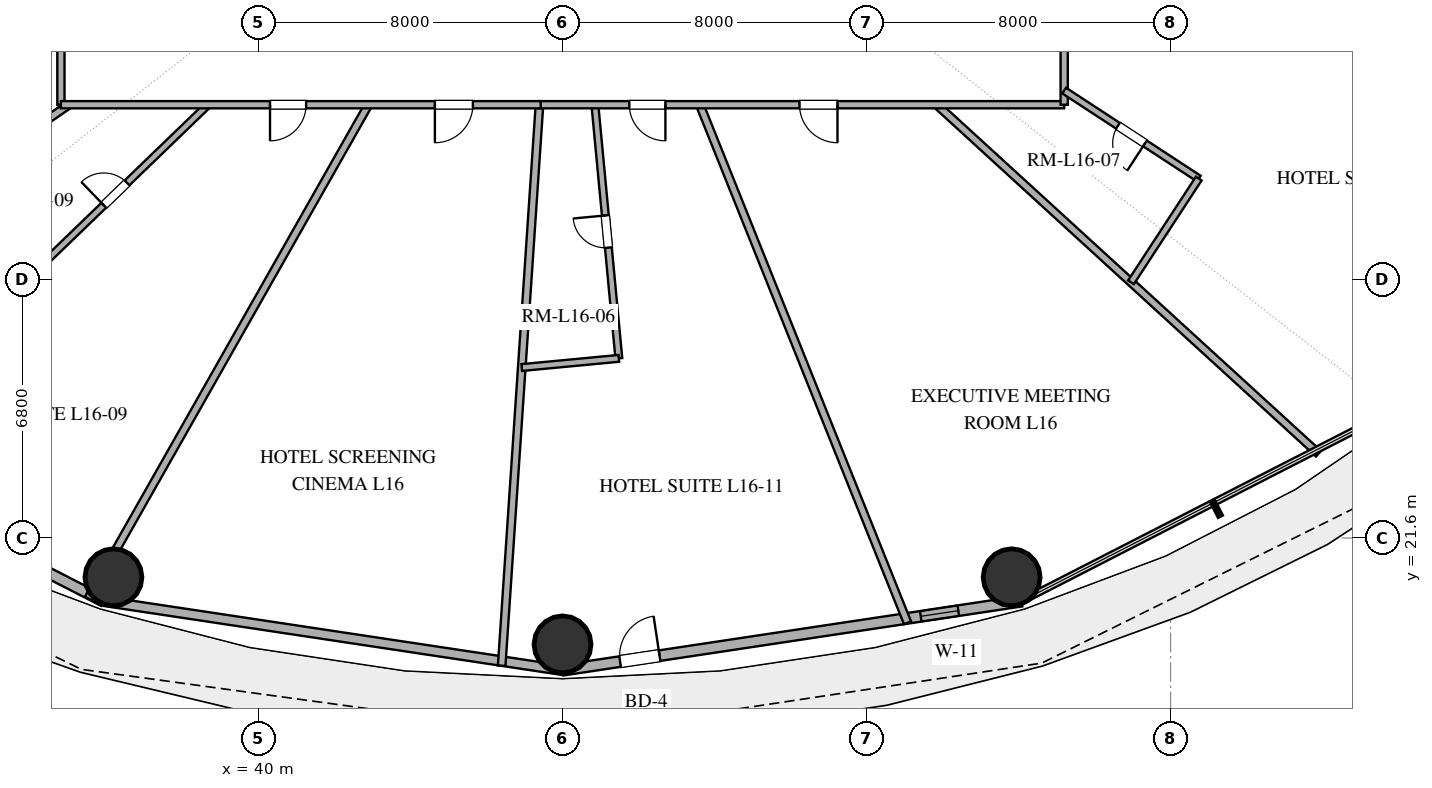
"""IFC4 building model, lengths in metres.
Left out: names, types, materials, properties, quantities, classifications, styles, units other than length and angle.
Written with IfcOpenShell. Run it as: python <this file> out.ifc"""

import sys

from ifc_helpers import new_model, si_unit, direction, frame, frame_2d, origin, origin_2d, place, context, subcontext, project, spatial, rectangle, hollow_circle, extrude, element, fill, save


model = new_model("IFC4")
c1 = context("Model", 3, precision=1e-05, world=origin(), true_north=direction((0.0, 1.0)))
c2 = subcontext(c1, "Body", "Model", "MODEL_VIEW")
j1 = project(units=[si_unit("LENGTHUNIT", "METRE"), si_unit("PLANEANGLEUNIT", "RADIAN")], contexts=[c1])
p1 = place(None, origin())
s1 = spatial("IfcSite", under=j1, at=p1, CompositionType="ELEMENT")
p2 = place(p1, origin())
s2 = spatial("IfcBuilding", under=s1, at=p2, CompositionType="ELEMENT")
p3 = place(p2, frame((0.0, 0.0, 67.8)))
s3 = spatial("IfcBuildingStorey", under=s2, at=p3, CompositionType="ELEMENT", Elevation=67.8)
for number, where, z_axis, x_axis in (
    (1, (36.182, 20.566, 0.0), (0.0, 0.0, 1.0), (1.0, 0.0, 0.0)),
    (2, (48.0, 18.8, 0.0), (0.0, 0.0, 1.0), (1.0, 0.0, 0.0)),
    (3, (59.818, 20.566, 0.0), (0.0, 0.0, 1.0), (1.0, 0.0, 0.0)),
):
    element("IfcColumn", number, at=place(p3, frame(where, z_axis=z_axis, x_axis=x_axis)), inside=s3, PredefinedType="COLUMN", context=c2, shape_type="SweptSolid", body=[
        extrude(hollow_circle(Radius=0.75, WallThickness=0.04, at=origin_2d()), origin(), (0.0, 0.0, 1.0), 3.38),
    ])
p4 = place(p3, frame((25.826, 25.114, 0.0), z_axis=(0.0, 0.0, 1.0), x_axis=(0.889853976658, -0.456245438581, 0.0)))
e4 = element("IfcWall", 4, at=p4, inside=s3, PredefinedType="SOLIDWALL", context=c2, shape_type="SweptSolid", body=[
    extrude(rectangle(XDim=11.346, YDim=0.28, at=frame_2d((5.673, 0.0))), origin(), (0.0, 0.0, 1.0), 3.38),
])
p5 = place(p4, frame((3.367, 0.0, 0.85)))
e5 = element("IfcOpeningElement", 5, at=p5, cuts=e4, PredefinedType="OPENING", context=c2, shape_type="SweptSolid", body=[
    extrude(rectangle(XDim=1.5, YDim=2.0, at=frame_2d((0.75, 1.0))), frame((0.0, 0.15, 0.0), z_axis=(0.0, -1.0, 0.0), x_axis=(1.0, 0.0, 0.0)), (0.0, 0.0, 1.0), 0.3),
])
p6 = place(p4, frame((6.629, 0.0, 0.85)))
e6 = element("IfcOpeningElement", 6, at=p6, cuts=e4, PredefinedType="OPENING", context=c2, shape_type="SweptSolid", body=[
    extrude(rectangle(XDim=1.5, YDim=2.0, at=frame_2d((0.75, 1.0))), frame((0.0, 0.15, 0.0), z_axis=(0.0, -1.0, 0.0), x_axis=(1.0, 0.0, 0.0)), (0.0, 0.0, 1.0), 0.3),
])
p7 = place(p3, frame((35.922, 19.938, 0.0), z_axis=(0.0, 0.0, 1.0), x_axis=(0.988864835849, -0.148816452121, 0.0)))
e7 = element("IfcWall", 7, at=p7, inside=s3, PredefinedType="SOLIDWALL", context=c2, shape_type="SweptSolid", body=[
    extrude(rectangle(XDim=12.214, YDim=0.25, at=frame_2d((6.107, 0.0))), origin(), (0.0, 0.0, 1.0), 3.38),
])
p8 = place(p3, frame((48.0, 18.12, 0.0), z_axis=(0.0, 0.0, 1.0), x_axis=(0.988864835849, 0.148816452121, 0.0)))
e8 = element("IfcWall", 8, at=p8, inside=s3, PredefinedType="SOLIDWALL", context=c2, shape_type="SweptSolid", body=[
    extrude(rectangle(XDim=12.214, YDim=0.28, at=frame_2d((6.107, 0.0))), origin(), (0.0, 0.0, 1.0), 3.38),
])
p9 = place(p8, frame((1.531, 0.0, 0.0)))
e9 = element("IfcOpeningElement", 9, at=p9, cuts=e8, PredefinedType="OPENING", context=c2, shape_type="SweptSolid", body=[
    extrude(rectangle(XDim=1.05, YDim=2.2, at=frame_2d((0.525, 1.1))), frame((0.0, 0.15, 0.0), z_axis=(0.0, -1.0, 0.0), x_axis=(1.0, 0.0, 0.0)), (0.0, 0.0, 1.0), 0.3),
])
p10 = place(p8, frame((9.531, 0.0, 0.85)))
e10 = element("IfcOpeningElement", 10, at=p10, cuts=e8, PredefinedType="OPENING", context=c2, shape_type="SweptSolid", body=[
    extrude(rectangle(XDim=1.0, YDim=1.8, at=frame_2d((0.5, 0.9))), frame((0.0, 0.15, 0.0), z_axis=(0.0, -1.0, 0.0), x_axis=(1.0, 0.0, 0.0)), (0.0, 0.0, 1.0), 0.3),
])
p11 = place(p3, frame((42.893, 33.0, 0.0), z_axis=(0.0, 0.0, 1.0), x_axis=(-0.493512300658, -0.869738816599, 0.0)))
e11 = element("IfcWall", 11, at=p11, inside=s3, PredefinedType="PARTITIONING", context=c2, shape_type="SweptSolid", body=[
    extrude(rectangle(XDim=14.938, YDim=0.2, at=frame_2d((7.469, 0.0))), origin(), (0.0, 0.0, 1.0), 2.74),
])
p12 = place(p3, frame((51.61, 33.0, 0.0), z_axis=(0.0, 0.0, 1.0), x_axis=(0.372301847193, -0.928111703717, 0.0)))
e12 = element("IfcWall", 12, at=p12, inside=s3, PredefinedType="PARTITIONING", context=c2, shape_type="SweptSolid", body=[
    extrude(rectangle(XDim=14.688, YDim=0.2, at=frame_2d((7.344, 0.0))), origin(), (0.0, 0.0, 1.0), 2.74),
])
p13 = place(p3, frame((76.816, 33.347, 0.0), z_axis=(0.0, 0.0, 1.0), x_axis=(-0.957749889613, 0.287602414708, 0.0)))
e13 = element("IfcWall", 13, at=p13, inside=s3, PredefinedType="PARTITIONING", context=c2, shape_type="SweptSolid", body=[
    extrude(rectangle(XDim=8.8, YDim=0.2, at=frame_2d((4.4, 0.0))), origin(), (0.0, 0.0, 1.0), 2.74),
])
p14 = place(p3, frame((35.009, 33.0, 0.0), z_axis=(0.0, 0.0, 1.0), x_axis=(-0.821999402566, -0.569488351226, 0.0)))
e14 = element("IfcWall", 14, at=p14, inside=s3, PredefinedType="PARTITIONING", context=c2, shape_type="SweptSolid", body=[
    extrude(rectangle(XDim=12.266, YDim=0.2, at=frame_2d((6.133, 0.0))), origin(), (0.0, 0.0, 1.0), 2.74),
])
p15 = place(p3, frame((47.393, 33.0, 0.0), z_axis=(0.0, 0.0, 1.0), x_axis=(-0.067284649742, -0.997733820169, 0.0)))
e15 = element("IfcWall", 15, at=p15, inside=s3, PredefinedType="PARTITIONING", context=c2, shape_type="SweptSolid", body=[
    extrude(rectangle(XDim=14.793, YDim=0.2, at=frame_2d((7.396, 0.0))), origin(), (0.0, 0.0, 1.0), 2.74),
])
p16 = place(p3, frame((57.846, 33.0, 0.0), z_axis=(0.0, 0.0, 1.0), x_axis=(0.738119160364, -0.674670367738, 0.0)))
e16 = element("IfcWall", 16, at=p16, inside=s3, PredefinedType="PARTITIONING", context=c2, shape_type="SweptSolid", body=[
    extrude(rectangle(XDim=13.61, YDim=0.2, at=frame_2d((6.805, 0.0))), origin(), (0.0, 0.0, 1.0), 2.74),
])
p17 = place(p3, frame((33.798, 28.299, 0.0), z_axis=(0.0, 0.0, 1.0), x_axis=(0.719667322044, 0.69431905172, 0.0)))
e17 = element("IfcWall", 17, at=p17, inside=s3, PredefinedType="PLUMBINGWALL", context=c2, shape_type="SweptSolid", body=[
    extrude(rectangle(XDim=6.771, YDim=0.18, at=frame_2d((3.385, 0.0))), origin(), (0.0, 0.0, 1.0), 2.74),
])
p18 = place(p17, frame((2.96, 0.0, 0.0)))
e18 = element("IfcOpeningElement", 18, at=p18, cuts=e17, PredefinedType="OPENING", context=c2, shape_type="SweptSolid", body=[
    extrude(rectangle(XDim=0.85, YDim=2.1, at=frame_2d((0.425, 1.05))), frame((0.0, 0.1, 0.0), z_axis=(0.0, -1.0, 0.0), x_axis=(1.0, 0.0, 0.0)), (0.0, 0.0, 1.0), 0.2),
])
p19 = place(p3, frame((49.482, 26.326, 0.0), z_axis=(0.0, 0.0, 1.0), x_axis=(-0.094107851527, 0.995562008255, 0.0)))
e19 = element("IfcWall", 19, at=p19, inside=s3, PredefinedType="PLUMBINGWALL", context=c2, shape_type="SweptSolid", body=[
    extrude(rectangle(XDim=6.704, YDim=0.18, at=frame_2d((3.352, 0.0))), origin(), (0.0, 0.0, 1.0), 2.74),
])
p20 = place(p19, frame((2.927, 0.0, 0.0)))
e20 = element("IfcOpeningElement", 20, at=p20, cuts=e19, PredefinedType="OPENING", context=c2, shape_type="SweptSolid", body=[
    extrude(rectangle(XDim=0.85, YDim=2.1, at=frame_2d((0.425, 1.05))), frame((0.0, 0.1, 0.0), z_axis=(0.0, -1.0, 0.0), x_axis=(1.0, 0.0, 0.0)), (0.0, 0.0, 1.0), 0.2),
])
p21 = place(p3, frame((61.2, 33.0, 0.0), z_axis=(0.0, 0.0, 1.0), x_axis=(-1.0, 0.0, 0.0)))
e21 = element("IfcWall", 21, at=p21, inside=s3, PredefinedType="PARTITIONING", context=c2, shape_type="SweptSolid", body=[
    extrude(rectangle(XDim=13.839, YDim=0.19, at=frame_2d((6.919, 0.0))), origin(), (0.0, 0.0, 1.0), 2.74),
])
p22 = place(p21, frame((5.965, 0.0, 0.0)))
e22 = element("IfcOpeningElement", 22, at=p22, cuts=e21, PredefinedType="OPENING", context=c2, shape_type="SweptSolid", body=[
    extrude(rectangle(XDim=1.0, YDim=2.2, at=frame_2d((0.5, 1.1))), frame((0.0, 0.105, 0.0), z_axis=(0.0, -1.0, 0.0), x_axis=(1.0, 0.0, 0.0)), (0.0, 0.0, 1.0), 0.21),
])
p23 = place(p21, frame((10.493, 0.0, 0.0)))
e23 = element("IfcOpeningElement", 23, at=p23, cuts=e21, PredefinedType="OPENING", context=c2, shape_type="SweptSolid", body=[
    extrude(rectangle(XDim=0.95, YDim=2.15, at=frame_2d((0.475, 1.075))), frame((0.0, 0.105, 0.0), z_axis=(0.0, -1.0, 0.0), x_axis=(1.0, 0.0, 0.0)), (0.0, 0.0, 1.0), 0.21),
])
p24 = place(p3, frame((61.2, 38.07, 0.0), z_axis=(0.0, 0.0, 1.0), x_axis=(0.0, -1.0, 0.0)))
e24 = element("IfcWall", 24, at=p24, inside=s3, PredefinedType="PARTITIONING", context=c2, shape_type="SweptSolid", body=[
    extrude(rectangle(XDim=5.07, YDim=0.19, at=frame_2d((2.535, 0.0))), origin(), (0.0, 0.0, 1.0), 2.74),
])
p25 = place(p24, frame((1.893, 0.0, 0.0)))
e25 = element("IfcOpeningElement", 25, at=p25, cuts=e24, PredefinedType="OPENING", context=c2, shape_type="SweptSolid", body=[
    extrude(rectangle(XDim=0.95, YDim=2.15, at=frame_2d((0.475, 1.075))), frame((0.0, 0.105, 0.0), z_axis=(0.0, -1.0, 0.0), x_axis=(1.0, 0.0, 0.0)), (0.0, 0.0, 1.0), 0.21),
])
p26 = place(p3, frame((34.8, 33.0, 0.0), z_axis=(0.0, 0.0, 1.0), x_axis=(0.0, 1.0, 0.0)))
e26 = element("IfcWall", 26, at=p26, inside=s3, PredefinedType="PARTITIONING", context=c2, shape_type="SweptSolid", body=[
    extrude(rectangle(XDim=6.942, YDim=0.19, at=frame_2d((3.471, 0.0))), origin(), (0.0, 0.0, 1.0), 2.74),
])
p27 = place(p26, frame((1.865, 0.0, 0.0)))
e27 = element("IfcOpeningElement", 27, at=p27, cuts=e26, PredefinedType="OPENING", context=c2, shape_type="SweptSolid", body=[
    extrude(rectangle(XDim=0.95, YDim=2.15, at=frame_2d((0.475, 1.075))), frame((0.0, 0.105, 0.0), z_axis=(0.0, -1.0, 0.0), x_axis=(1.0, 0.0, 0.0)), (0.0, 0.0, 1.0), 0.21),
])
p28 = place(p3, frame((47.425, 33.0, 0.0), z_axis=(0.0, 0.0, 1.0), x_axis=(-1.0, 0.0, 0.0)))
e28 = element("IfcWall", 28, at=p28, inside=s3, PredefinedType="PARTITIONING", context=c2, shape_type="SweptSolid", body=[
    extrude(rectangle(XDim=12.625, YDim=0.19, at=frame_2d((6.312, 0.0))), origin(), (0.0, 0.0, 1.0), 2.74),
])
p29 = place(p28, frame((1.784, 0.0, 0.0)))
e29 = element("IfcOpeningElement", 29, at=p29, cuts=e28, PredefinedType="OPENING", context=c2, shape_type="SweptSolid", body=[
    extrude(rectangle(XDim=1.0, YDim=2.2, at=frame_2d((0.5, 1.1))), frame((0.0, 0.105, 0.0), z_axis=(0.0, -1.0, 0.0), x_axis=(1.0, 0.0, 0.0)), (0.0, 0.0, 1.0), 0.21),
])
p30 = place(p28, frame((6.173, 0.0, 0.0)))
e30 = element("IfcOpeningElement", 30, at=p30, cuts=e28, PredefinedType="OPENING", context=c2, shape_type="SweptSolid", body=[
    extrude(rectangle(XDim=0.95, YDim=2.15, at=frame_2d((0.475, 1.075))), frame((0.0, 0.105, 0.0), z_axis=(0.0, -1.0, 0.0), x_axis=(1.0, 0.0, 0.0)), (0.0, 0.0, 1.0), 0.21),
])
p31 = place(p3, frame((64.742, 31.056, 0.0), z_axis=(0.0, 0.0, 1.0), x_axis=(-0.837031612028, 0.5471545307, 0.0)))
e31 = element("IfcWall", 31, at=p31, inside=s3, PredefinedType="PLUMBINGWALL", context=c2, shape_type="SweptSolid", body=[
    extrude(rectangle(XDim=4.231, YDim=0.18, at=frame_2d((2.116, 0.0))), origin(), (0.0, 0.0, 1.0), 2.74),
])
p32 = place(p31, frame((1.691, 0.0, 0.0)))
e32 = element("IfcOpeningElement", 32, at=p32, cuts=e31, PredefinedType="OPENING", context=c2, shape_type="SweptSolid", body=[
    extrude(rectangle(XDim=0.85, YDim=2.1, at=frame_2d((0.425, 1.05))), frame((0.0, 0.1, 0.0), z_axis=(0.0, -1.0, 0.0), x_axis=(1.0, 0.0, 0.0)), (0.0, 0.0, 1.0), 0.2),
])
p33 = place(p3, frame((62.958, 28.328, 0.0), z_axis=(0.0, 0.0, 1.0), x_axis=(0.547176717469, 0.837017108463, 0.0)))
e33 = element("IfcWall", 33, at=p33, inside=s3, PredefinedType="PLUMBINGWALL", context=c2, shape_type="SweptSolid", body=[
    extrude(rectangle(XDim=3.26, YDim=0.18, at=frame_2d((1.63, 0.0))), origin(), (0.0, 0.0, 1.0), 2.74),
])
p34 = place(p3, frame((46.927, 26.085, 0.0), z_axis=(0.0, 0.0, 1.0), x_axis=(0.995563205557, 0.09409518447, 0.0)))
e34 = element("IfcWall", 34, at=p34, inside=s3, PredefinedType="PLUMBINGWALL", context=c2, shape_type="SweptSolid", body=[
    extrude(rectangle(XDim=2.566, YDim=0.18, at=frame_2d((1.283, 0.0))), origin(), (0.0, 0.0, 1.0), 2.74),
])
p35 = place(p9, origin())
e35 = element("IfcDoor", 35, at=p35, inside=s3, OperationType="SINGLE_SWING_RIGHT", PredefinedType="DOOR", context=c2, shape_type="SweptSolid", body=[
    extrude(rectangle(XDim=1.05, YDim=2.2, at=frame_2d((0.525, 1.1))), frame((0.0, 0.025, 0.0), z_axis=(0.0, -1.0, 0.0), x_axis=(1.0, 0.0, 0.0)), (0.0, 0.0, 1.0), 0.05),
])
fill(e9, e35)
p36 = place(p10, origin())
e36 = element("IfcWindow", 36, at=p36, inside=s3, PartitioningType="SINGLE_PANEL", PredefinedType="WINDOW", context=c2, shape_type="SweptSolid", body=[
    extrude(rectangle(XDim=1.0, YDim=1.8, at=frame_2d((0.5, 0.9))), frame((0.0, 0.03, 0.0), z_axis=(0.0, -1.0, 0.0), x_axis=(1.0, 0.0, 0.0)), (0.0, 0.0, 1.0), 0.06),
])
fill(e10, e36)
p37 = place(p18, origin())
e37 = element("IfcDoor", 37, at=p37, inside=s3, OperationType="SINGLE_SWING_LEFT", PredefinedType="DOOR", context=c2, shape_type="SweptSolid", body=[
    extrude(rectangle(XDim=0.85, YDim=2.1, at=frame_2d((0.425, 1.05))), frame((0.0, 0.025, 0.0), z_axis=(0.0, -1.0, 0.0), x_axis=(1.0, 0.0, 0.0)), (0.0, 0.0, 1.0), 0.05),
])
fill(e18, e37)
p38 = place(p20, origin())
e38 = element("IfcDoor", 38, at=p38, inside=s3, OperationType="SINGLE_SWING_RIGHT", PredefinedType="DOOR", context=c2, shape_type="SweptSolid", body=[
    extrude(rectangle(XDim=0.85, YDim=2.1, at=frame_2d((0.425, 1.05))), frame((0.0, 0.025, 0.0), z_axis=(0.0, -1.0, 0.0), x_axis=(1.0, 0.0, 0.0)), (0.0, 0.0, 1.0), 0.05),
])
fill(e20, e38)
p39 = place(p22, origin())
e39 = element("IfcDoor", 39, at=p39, inside=s3, OperationType="SINGLE_SWING_LEFT", PredefinedType="DOOR", context=c2, shape_type="SweptSolid", body=[
    extrude(rectangle(XDim=1.0, YDim=2.2, at=frame_2d((0.5, 1.1))), frame((0.0, 0.025, 0.0), z_axis=(0.0, -1.0, 0.0), x_axis=(1.0, 0.0, 0.0)), (0.0, 0.0, 1.0), 0.05),
])
fill(e22, e39)
p40 = place(p23, origin())
e40 = element("IfcDoor", 40, at=p40, inside=s3, OperationType="SINGLE_SWING_LEFT", PredefinedType="DOOR", context=c2, shape_type="SweptSolid", body=[
    extrude(rectangle(XDim=0.95, YDim=2.15, at=frame_2d((0.475, 1.075))), frame((0.0, 0.025, 0.0), z_axis=(0.0, -1.0, 0.0), x_axis=(1.0, 0.0, 0.0)), (0.0, 0.0, 1.0), 0.05),
])
fill(e23, e40)
p41 = place(p29, origin())
e41 = element("IfcDoor", 41, at=p41, inside=s3, OperationType="SINGLE_SWING_RIGHT", PredefinedType="DOOR", context=c2, shape_type="SweptSolid", body=[
    extrude(rectangle(XDim=1.0, YDim=2.2, at=frame_2d((0.5, 1.1))), frame((0.0, 0.025, 0.0), z_axis=(0.0, -1.0, 0.0), x_axis=(1.0, 0.0, 0.0)), (0.0, 0.0, 1.0), 0.05),
])
fill(e29, e41)
p42 = place(p30, origin())
e42 = element("IfcDoor", 42, at=p42, inside=s3, OperationType="SINGLE_SWING_RIGHT", PredefinedType="DOOR", context=c2, shape_type="SweptSolid", body=[
    extrude(rectangle(XDim=0.95, YDim=2.15, at=frame_2d((0.475, 1.075))), frame((0.0, 0.025, 0.0), z_axis=(0.0, -1.0, 0.0), x_axis=(1.0, 0.0, 0.0)), (0.0, 0.0, 1.0), 0.05),
])
fill(e30, e42)
p43 = place(p32, origin())
e43 = element("IfcDoor", 43, at=p43, inside=s3, OperationType="SINGLE_SWING_LEFT", PredefinedType="DOOR", context=c2, shape_type="SweptSolid", body=[
    extrude(rectangle(XDim=0.85, YDim=2.1, at=frame_2d((0.425, 1.05))), frame((0.0, 0.025, 0.0), z_axis=(0.0, -1.0, 0.0), x_axis=(1.0, 0.0, 0.0)), (0.0, 0.0, 1.0), 0.05),
])
fill(e32, e43)
save(model, sys.argv[1])
